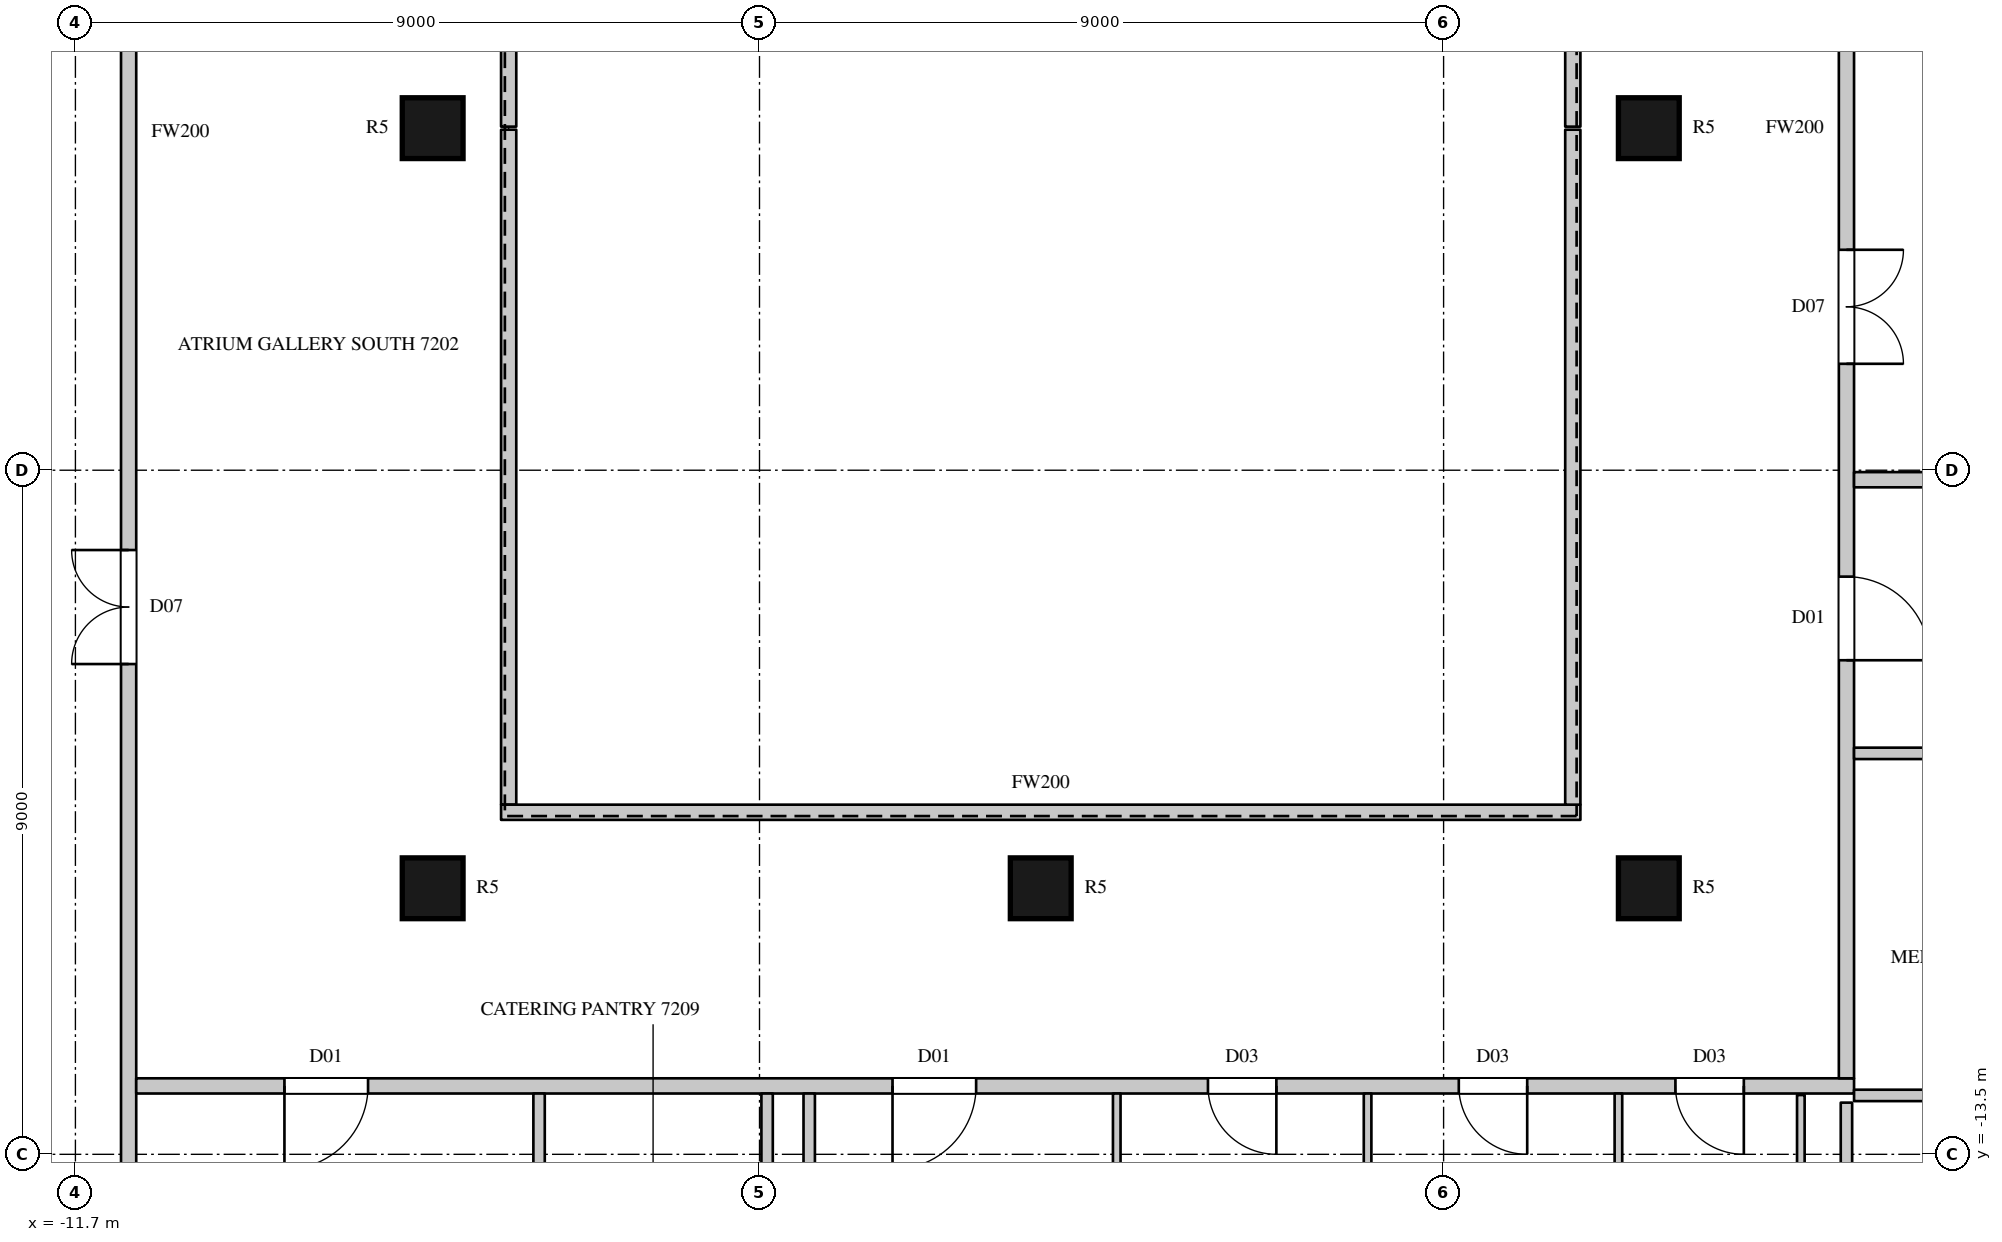
"""IFC4 building model, lengths in metres.
Left out: names, types, materials, properties, quantities, classifications, styles, units other than length and angle.
Written with IfcOpenShell. Run it as: python <this file> out.ifc"""

import sys

from ifc_helpers import new_model, si_unit, direction, frame, frame_2d, origin, origin_2d, place, context, subcontext, project, spatial, rectangle, circle, extrude, element, fill, save


model = new_model("IFC4")
c1 = context("Model", 3, precision=1e-05, world=origin(), true_north=direction((0.0, 1.0)))
c2 = subcontext(c1, "Body", "Model", "MODEL_VIEW")
j1 = project(units=[si_unit("LENGTHUNIT", "METRE"), si_unit("PLANEANGLEUNIT", "RADIAN")], contexts=[c1])
p1 = place(None, origin())
s1 = spatial("IfcSite", under=j1, at=p1, CompositionType="ELEMENT")
p2 = place(p1, origin())
s2 = spatial("IfcBuilding", under=s1, at=p2, CompositionType="ELEMENT")
p3 = place(p2, frame((0.0, 0.0, 317.2)))
s3 = spatial("IfcBuildingStorey", under=s2, at=p3, CompositionType="ELEMENT", Elevation=317.2)
for number, where, z_axis, x_axis in (
    (1, (-7.0, -10.0, 0.0), (0.0, 0.0, 1.0), (1.0, 0.0, 0.0)),
    (2, (-7.0, 0.0, 0.0), (0.0, 0.0, 1.0), (1.0, 0.0, 0.0)),
    (3, (1.0, -10.0, 0.0), (0.0, 0.0, 1.0), (1.0, 0.0, 0.0)),
    (4, (9.0, -10.0, 0.0), (0.0, 0.0, 1.0), (1.0, 0.0, 0.0)),
    (5, (9.0, 0.0, 0.0), (0.0, 0.0, 1.0), (1.0, 0.0, 0.0)),
):
    element("IfcColumn", number, at=place(p3, frame(where, z_axis=z_axis, x_axis=x_axis)), inside=s3, PredefinedType="COLUMN", context=c2, shape_type="SweptSolid", body=[
        extrude(circle(Radius=0.4, at=origin_2d()), origin(), (0.0, 0.0, 1.0), 4.1),
    ])
p4 = place(p3, frame((-11.0, -14.8, 0.0), z_axis=(0.0, 0.0, 1.0), x_axis=(0.0, 1.0, 0.0)))
e6 = element("IfcWall", 6, at=p4, inside=s3, PredefinedType="PARTITIONING", context=c2, shape_type="SweptSolid", body=[
    extrude(rectangle(XDim=29.5, YDim=0.2, at=frame_2d((14.75, 0.0))), origin(), (0.0, 0.0, 1.0), 3.8),
])
p5 = place(p4, frame((7.75, 0.0, 0.0)))
e7 = element("IfcOpeningElement", 7, at=p5, cuts=e6, PredefinedType="OPENING", context=c2, shape_type="SweptSolid", body=[
    extrude(rectangle(XDim=1.5, YDim=2.4, at=frame_2d((0.75, 1.2))), frame((0.0, 0.11, 0.0), z_axis=(0.0, -1.0, 0.0), x_axis=(1.0, 0.0, 0.0)), (0.0, 0.0, 1.0), 0.22),
])
p6 = place(p3, frame((-10.9, -12.6, 0.0), z_axis=(0.0, 0.0, 1.0), x_axis=(1.0, 0.0, 0.0)))
e8 = element("IfcWall", 8, at=p6, inside=s3, PredefinedType="PARTITIONING", context=c2, shape_type="SweptSolid", body=[
    extrude(rectangle(XDim=22.6, YDim=0.2, at=frame_2d((11.3, 0.0))), origin(), (0.0, 0.0, 1.0), 3.8),
])
p7 = place(p6, frame((14.1, 0.0, 0.0)))
e9 = element("IfcOpeningElement", 9, at=p7, cuts=e8, PredefinedType="OPENING", context=c2, shape_type="SweptSolid", body=[
    extrude(rectangle(XDim=0.9, YDim=2.2, at=frame_2d((0.45, 1.1))), frame((0.0, 0.11, 0.0), z_axis=(0.0, -1.0, 0.0), x_axis=(1.0, 0.0, 0.0)), (0.0, 0.0, 1.0), 0.22),
])
p8 = place(p6, frame((17.4, 0.0, 0.0)))
e10 = element("IfcOpeningElement", 10, at=p8, cuts=e8, PredefinedType="OPENING", context=c2, shape_type="SweptSolid", body=[
    extrude(rectangle(XDim=0.9, YDim=2.2, at=frame_2d((0.45, 1.1))), frame((0.0, 0.11, 0.0), z_axis=(0.0, -1.0, 0.0), x_axis=(1.0, 0.0, 0.0)), (0.0, 0.0, 1.0), 0.22),
])
p9 = place(p6, frame((20.25, 0.0, 0.0)))
e11 = element("IfcOpeningElement", 11, at=p9, cuts=e8, PredefinedType="OPENING", context=c2, shape_type="SweptSolid", body=[
    extrude(rectangle(XDim=0.9, YDim=2.2, at=frame_2d((0.45, 1.1))), frame((0.0, 0.11, 0.0), z_axis=(0.0, -1.0, 0.0), x_axis=(1.0, 0.0, 0.0)), (0.0, 0.0, 1.0), 0.22),
])
p10 = place(p6, frame((1.95, 0.0, 0.0)))
e12 = element("IfcOpeningElement", 12, at=p10, cuts=e8, PredefinedType="OPENING", context=c2, shape_type="SweptSolid", body=[
    extrude(rectangle(XDim=1.1, YDim=2.4, at=frame_2d((0.55, 1.2))), frame((0.0, 0.11, 0.0), z_axis=(0.0, -1.0, 0.0), x_axis=(1.0, 0.0, 0.0)), (0.0, 0.0, 1.0), 0.22),
])
p11 = place(p6, frame((9.95, 0.0, 0.0)))
e13 = element("IfcOpeningElement", 13, at=p11, cuts=e8, PredefinedType="OPENING", context=c2, shape_type="SweptSolid", body=[
    extrude(rectangle(XDim=1.1, YDim=2.4, at=frame_2d((0.55, 1.2))), frame((0.0, 0.11, 0.0), z_axis=(0.0, -1.0, 0.0), x_axis=(1.0, 0.0, 0.0)), (0.0, 0.0, 1.0), 0.22),
])
p12 = place(p3, frame((-6.0, -8.9, 0.0), z_axis=(0.0, 0.0, 1.0), x_axis=(0.0, 1.0, 0.0)))
e14 = element("IfcWall", 14, at=p12, inside=s3, PredefinedType="PARTITIONING", context=c2, shape_type="SweptSolid", body=[
    extrude(rectangle(XDim=8.88, YDim=0.2, at=frame_2d((4.44, 0.0))), origin(), (0.0, 0.0, 1.0), 3.8),
])
p13 = place(p3, frame((-6.1, -9.0, 0.0), z_axis=(0.0, 0.0, 1.0), x_axis=(1.0, 0.0, 0.0)))
e15 = element("IfcWall", 15, at=p13, inside=s3, PredefinedType="PARTITIONING", context=c2, shape_type="SweptSolid", body=[
    extrude(rectangle(XDim=14.2, YDim=0.2, at=frame_2d((7.1, 0.0))), origin(), (0.0, 0.0, 1.0), 3.8),
])
for number, where, z_axis, x_axis in (
    (16, (-6.0, 0.02, 0.0), (0.0, 0.0, 1.0), (0.0, 1.0, 0.0)),
    (17, (8.0, -8.9, 0.0), (0.0, 0.0, 1.0), (0.0, 1.0, 0.0)),
    (18, (8.0, 0.02, 0.0), (0.0, 0.0, 1.0), (0.0, 1.0, 0.0)),
):
    element("IfcWall", number, at=place(p3, frame(where, z_axis=z_axis, x_axis=x_axis)), inside=s3, PredefinedType="PARTITIONING", context=c2, shape_type="SweptSolid", body=[
        extrude(rectangle(XDim=8.88, YDim=0.2, at=frame_2d((4.44, 0.0))), origin(), (0.0, 0.0, 1.0), 3.8),
    ])
p14 = place(p3, frame((11.6, -12.5, 0.0), z_axis=(0.0, 0.0, 1.0), x_axis=(0.0, 1.0, 0.0)))
e19 = element("IfcWall", 19, at=p14, inside=s3, PredefinedType="PARTITIONING", context=c2, shape_type="SweptSolid", body=[
    extrude(rectangle(XDim=25.0, YDim=0.2, at=frame_2d((12.5, 0.0))), origin(), (0.0, 0.0, 1.0), 3.8),
])
p15 = place(p14, frame((9.4, 0.0, 0.0)))
e20 = element("IfcOpeningElement", 20, at=p15, cuts=e19, PredefinedType="OPENING", context=c2, shape_type="SweptSolid", body=[
    extrude(rectangle(XDim=1.5, YDim=2.4, at=frame_2d((0.75, 1.2))), frame((0.0, 0.11, 0.0), z_axis=(0.0, -1.0, 0.0), x_axis=(1.0, 0.0, 0.0)), (0.0, 0.0, 1.0), 0.22),
])
p16 = place(p14, frame((5.5, 0.0, 0.0)))
e21 = element("IfcOpeningElement", 21, at=p16, cuts=e19, PredefinedType="OPENING", context=c2, shape_type="SweptSolid", body=[
    extrude(rectangle(XDim=1.1, YDim=2.4, at=frame_2d((0.55, 1.2))), frame((0.0, 0.11, 0.0), z_axis=(0.0, -1.0, 0.0), x_axis=(1.0, 0.0, 0.0)), (0.0, 0.0, 1.0), 0.22),
])
p17 = place(p3, frame((11.7, -4.625, 0.0), z_axis=(0.0, 0.0, 1.0), x_axis=(1.0, 0.0, 0.0)))
e22 = element("IfcWall", 22, at=p17, inside=s3, PredefinedType="PARTITIONING", context=c2, shape_type="SweptSolid", body=[
    extrude(rectangle(XDim=2.975, YDim=0.2, at=frame_2d((1.488, 0.0))), origin(), (0.0, 0.0, 1.0), 3.8),
])
p18 = place(p3, frame((-5.6, -16.725, 0.0), z_axis=(0.0, 0.0, 1.0), x_axis=(0.0, 1.0, 0.0)))
e23 = element("IfcWall", 23, at=p18, inside=s3, PredefinedType="PARTITIONING", context=c2, shape_type="SweptSolid", body=[
    extrude(rectangle(XDim=4.025, YDim=0.15, at=frame_2d((2.013, 0.0))), origin(), (0.0, 0.0, 1.0), 3.8),
])
p19 = place(p18, frame((1.55, 0.0, 0.0)))
e24 = element("IfcOpeningElement", 24, at=p19, cuts=e23, PredefinedType="OPENING", context=c2, shape_type="SweptSolid", body=[
    extrude(rectangle(XDim=0.95, YDim=2.2, at=frame_2d((0.475, 1.1))), frame((0.0, 0.085, 0.0), z_axis=(0.0, -1.0, 0.0), x_axis=(1.0, 0.0, 0.0)), (0.0, 0.0, 1.0), 0.17),
])
p20 = place(p3, frame((-2.6, -16.725, 0.0), z_axis=(0.0, 0.0, 1.0), x_axis=(0.0, 1.0, 0.0)))
e25 = element("IfcWall", 25, at=p20, inside=s3, PredefinedType="PARTITIONING", context=c2, shape_type="SweptSolid", body=[
    extrude(rectangle(XDim=4.025, YDim=0.15, at=frame_2d((2.013, 0.0))), origin(), (0.0, 0.0, 1.0), 3.8),
])
p21 = place(p3, frame((-2.046, -23.542, 0.0), z_axis=(0.0, 0.0, 1.0), x_axis=(0.0, 1.0, 0.0)))
e26 = element("IfcWall", 26, at=p21, inside=s3, PredefinedType="PARTITIONING", context=c2, shape_type="SweptSolid", body=[
    extrude(rectangle(XDim=10.842, YDim=0.15, at=frame_2d((5.421, 0.0))), origin(), (0.0, 0.0, 1.0), 3.8),
])
p22 = place(p3, frame((11.6, -15.425, 0.0), z_axis=(0.0, 0.0, 1.0), x_axis=(0.0, 1.0, 0.0)))
e27 = element("IfcWall", 27, at=p22, inside=s3, PredefinedType="PARTITIONING", context=c2, shape_type="SweptSolid", body=[
    extrude(rectangle(XDim=2.605, YDim=0.15, at=frame_2d((1.302, 0.0))), origin(), (0.0, 0.0, 1.0), 3.8),
])
p23 = place(p3, frame((11.7, -12.725, 0.0), z_axis=(0.0, 0.0, 1.0), x_axis=(1.0, 0.0, 0.0)))
e28 = element("IfcWall", 28, at=p23, inside=s3, PredefinedType="PARTITIONING", context=c2, shape_type="SweptSolid", body=[
    extrude(rectangle(XDim=3.725, YDim=0.15, at=frame_2d((1.863, 0.0))), origin(), (0.0, 0.0, 1.0), 3.8),
])
p24 = place(p3, frame((11.7, -8.225, 0.0), z_axis=(0.0, 0.0, 1.0), x_axis=(1.0, 0.0, 0.0)))
e29 = element("IfcWall", 29, at=p24, inside=s3, PredefinedType="PARTITIONING", context=c2, shape_type="SweptSolid", body=[
    extrude(rectangle(XDim=3.875, YDim=0.15, at=frame_2d((1.938, 0.0))), origin(), (0.0, 0.0, 1.0), 3.15),
])
p25 = place(p24, frame((2.65, 0.0, 0.0)))
e30 = element("IfcOpeningElement", 30, at=p25, cuts=e29, PredefinedType="OPENING", context=c2, shape_type="SweptSolid", body=[
    extrude(rectangle(XDim=0.95, YDim=2.2, at=frame_2d((0.475, 1.1))), frame((0.0, 0.085, 0.0), z_axis=(0.0, -1.0, 0.0), x_axis=(1.0, 0.0, 0.0)), (0.0, 0.0, 1.0), 0.17),
])
p26 = place(p3, frame((2.0, -23.344, 0.0), z_axis=(0.0, 0.0, 1.0), x_axis=(0.0, 1.0, 0.0)))
e31 = element("IfcWall", 31, at=p26, inside=s3, PredefinedType="PARTITIONING", context=c2, shape_type="SweptSolid", body=[
    extrude(rectangle(XDim=10.644, YDim=0.1, at=frame_2d((5.322, 0.0))), origin(), (0.0, 0.0, 1.0), 3.8),
])
p27 = place(p3, frame((5.3, -22.25, 0.0), z_axis=(0.0, 0.0, 1.0), x_axis=(0.0, 1.0, 0.0)))
e32 = element("IfcWall", 32, at=p27, inside=s3, PredefinedType="PARTITIONING", context=c2, shape_type="SweptSolid", body=[
    extrude(rectangle(XDim=9.55, YDim=0.1, at=frame_2d((4.775, 0.0))), origin(), (0.0, 0.0, 1.0), 3.8),
])
p28 = place(p3, frame((8.6, -21.576, 0.0), z_axis=(0.0, 0.0, 1.0), x_axis=(0.0, 1.0, 0.0)))
e33 = element("IfcWall", 33, at=p28, inside=s3, PredefinedType="PARTITIONING", context=c2, shape_type="SweptSolid", body=[
    extrude(rectangle(XDim=8.876, YDim=0.1, at=frame_2d((4.438, 0.0))), origin(), (0.0, 0.0, 1.0), 3.8),
])
p29 = place(p3, frame((11.0, -20.721, 0.0), z_axis=(0.0, 0.0, 1.0), x_axis=(0.0, 1.0, 0.0)))
e34 = element("IfcWall", 34, at=p29, inside=s3, PredefinedType="PARTITIONING", context=c2, shape_type="SweptSolid", body=[
    extrude(rectangle(XDim=8.001, YDim=0.1, at=frame_2d((4.001, 0.0))), origin(), (0.0, 0.0, 1.0), 3.8),
])
p30 = place(p5, origin())
e35 = element("IfcDoor", 35, at=p30, inside=s3, OperationType="DOUBLE_DOOR_SINGLE_SWING", PredefinedType="DOOR", context=c2, shape_type="SweptSolid", body=[
    extrude(rectangle(XDim=1.5, YDim=2.4, at=frame_2d((0.75, 1.2))), frame((0.0, 0.025, 0.0), z_axis=(0.0, -1.0, 0.0), x_axis=(1.0, 0.0, 0.0)), (0.0, 0.0, 1.0), 0.05),
])
fill(e7, e35)
p31 = place(p15, origin())
e36 = element("IfcDoor", 36, at=p31, inside=s3, OperationType="DOUBLE_DOOR_SINGLE_SWING", PredefinedType="DOOR", context=c2, shape_type="SweptSolid", body=[
    extrude(rectangle(XDim=1.5, YDim=2.4, at=frame_2d((0.75, 1.2))), frame((0.0, 0.025, 0.0), z_axis=(0.0, -1.0, 0.0), x_axis=(1.0, 0.0, 0.0)), (0.0, 0.0, 1.0), 0.05),
])
fill(e20, e36)
p32 = place(p7, origin())
e37 = element("IfcDoor", 37, at=p32, inside=s3, OperationType="SINGLE_SWING_LEFT", PredefinedType="DOOR", context=c2, shape_type="SweptSolid", body=[
    extrude(rectangle(XDim=0.9, YDim=2.2, at=frame_2d((0.45, 1.1))), frame((0.0, 0.025, 0.0), z_axis=(0.0, -1.0, 0.0), x_axis=(1.0, 0.0, 0.0)), (0.0, 0.0, 1.0), 0.05),
])
fill(e9, e37)
p33 = place(p8, origin())
e38 = element("IfcDoor", 38, at=p33, inside=s3, OperationType="SINGLE_SWING_LEFT", PredefinedType="DOOR", context=c2, shape_type="SweptSolid", body=[
    extrude(rectangle(XDim=0.9, YDim=2.2, at=frame_2d((0.45, 1.1))), frame((0.0, 0.025, 0.0), z_axis=(0.0, -1.0, 0.0), x_axis=(1.0, 0.0, 0.0)), (0.0, 0.0, 1.0), 0.05),
])
fill(e10, e38)
p34 = place(p9, origin())
e39 = element("IfcDoor", 39, at=p34, inside=s3, OperationType="SINGLE_SWING_LEFT", PredefinedType="DOOR", context=c2, shape_type="SweptSolid", body=[
    extrude(rectangle(XDim=0.9, YDim=2.2, at=frame_2d((0.45, 1.1))), frame((0.0, 0.025, 0.0), z_axis=(0.0, -1.0, 0.0), x_axis=(1.0, 0.0, 0.0)), (0.0, 0.0, 1.0), 0.05),
])
fill(e11, e39)
p35 = place(p10, origin())
e40 = element("IfcDoor", 40, at=p35, inside=s3, OperationType="SINGLE_SWING_RIGHT", PredefinedType="DOOR", context=c2, shape_type="SweptSolid", body=[
    extrude(rectangle(XDim=1.1, YDim=2.4, at=frame_2d((0.55, 1.2))), frame((0.0, 0.025, 0.0), z_axis=(0.0, -1.0, 0.0), x_axis=(1.0, 0.0, 0.0)), (0.0, 0.0, 1.0), 0.05),
])
fill(e12, e40)
p36 = place(p11, origin())
e41 = element("IfcDoor", 41, at=p36, inside=s3, OperationType="SINGLE_SWING_RIGHT", PredefinedType="DOOR", context=c2, shape_type="SweptSolid", body=[
    extrude(rectangle(XDim=1.1, YDim=2.4, at=frame_2d((0.55, 1.2))), frame((0.0, 0.025, 0.0), z_axis=(0.0, -1.0, 0.0), x_axis=(1.0, 0.0, 0.0)), (0.0, 0.0, 1.0), 0.05),
])
fill(e13, e41)
p37 = place(p16, origin())
e42 = element("IfcDoor", 42, at=p37, inside=s3, OperationType="SINGLE_SWING_RIGHT", PredefinedType="DOOR", context=c2, shape_type="SweptSolid", body=[
    extrude(rectangle(XDim=1.1, YDim=2.4, at=frame_2d((0.55, 1.2))), frame((0.0, 0.025, 0.0), z_axis=(0.0, -1.0, 0.0), x_axis=(1.0, 0.0, 0.0)), (0.0, 0.0, 1.0), 0.05),
])
fill(e21, e42)
save(model, sys.argv[1])
